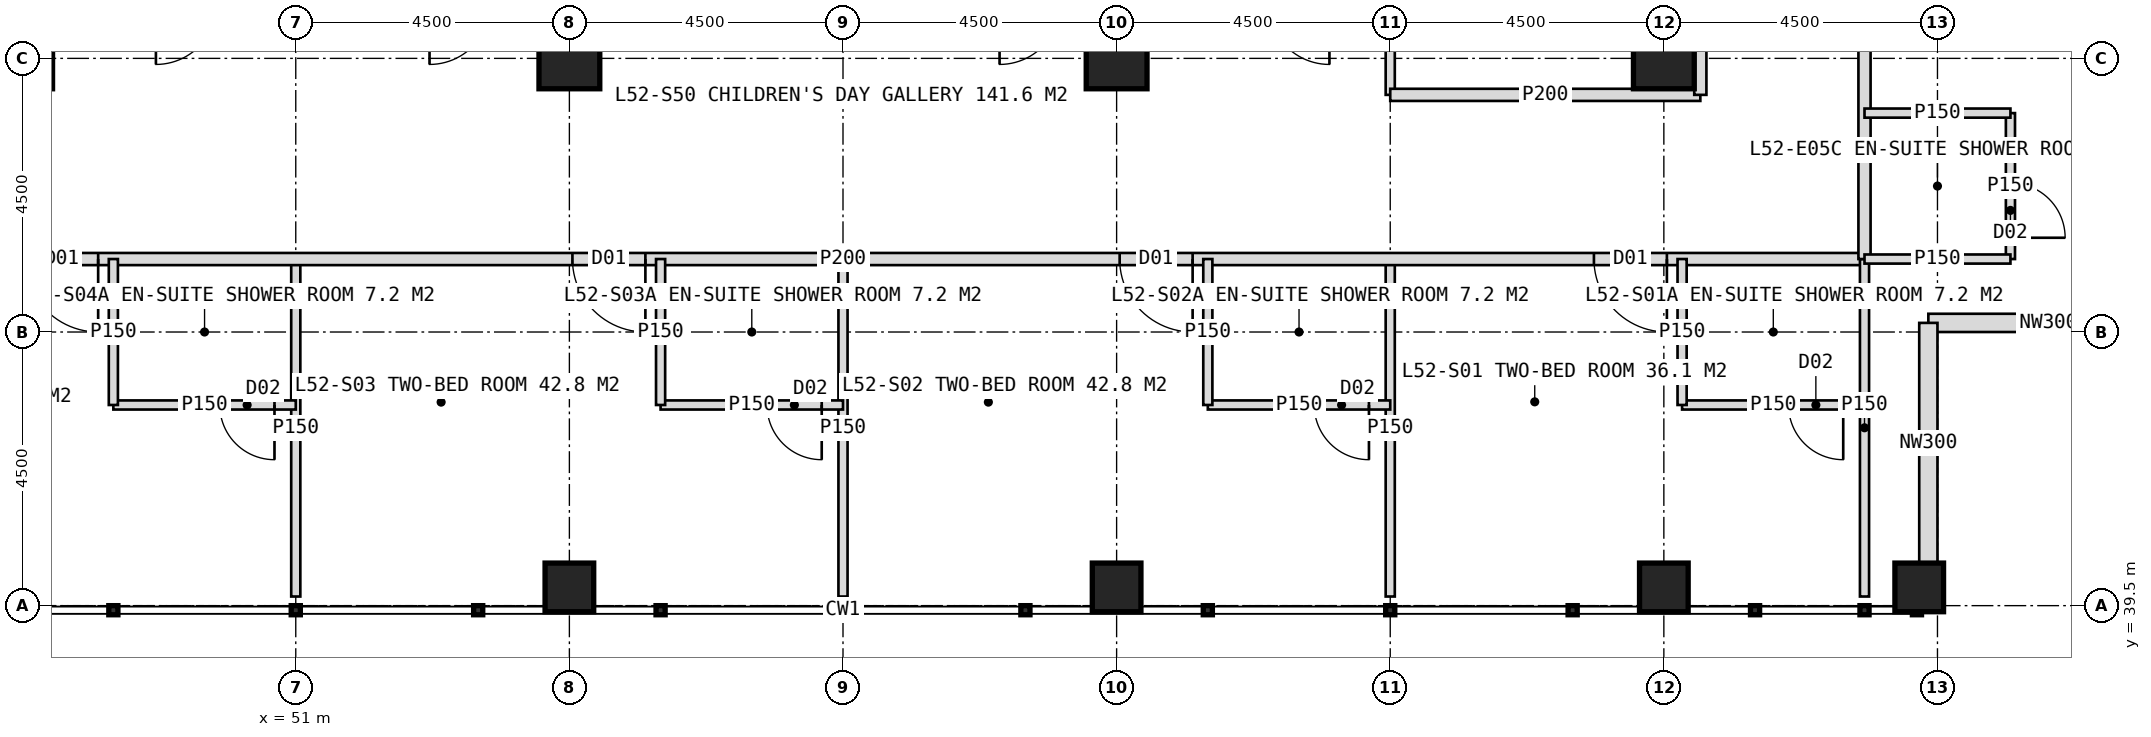
"""IFC4 building model, lengths in metres.
Left out: names, types, materials, properties, quantities, classifications, styles, units other than length and angle.
Written with IfcOpenShell. Run it as: python <this file> out.ifc"""

import sys

from ifc_helpers import new_model, si_unit, direction, frame, frame_2d, origin, origin_2d, place, context, subcontext, project, spatial, rectangle, hollow_rectangle, extrude, element, fill, save


model = new_model("IFC4")
c1 = context("Model", 3, precision=1e-05, world=origin(), true_north=direction((0.0, 1.0)))
c2 = subcontext(c1, "Body", "Model", "MODEL_VIEW")
j1 = project(units=[si_unit("LENGTHUNIT", "METRE"), si_unit("PLANEANGLEUNIT", "RADIAN")], contexts=[c1])
p1 = place(None, origin())
s1 = spatial("IfcSite", under=j1, at=p1, CompositionType="ELEMENT")
p2 = place(p1, origin())
s2 = spatial("IfcBuilding", under=s1, at=p2, CompositionType="ELEMENT")
p3 = place(p2, frame((0.0, 0.0, 217.0)))
s3 = spatial("IfcBuildingStorey", under=s2, at=p3, CompositionType="ELEMENT", Elevation=217.0)
for number, where, z_axis, x_axis in (
    (1, (73.5, 48.5, 0.0), (0.0, 0.0, 1.0), (1.0, 0.0, 0.0)),
    (2, (55.5, 48.5, 0.0), (0.0, 0.0, 1.0), (1.0, 0.0, 0.0)),
    (3, (64.5, 48.5, 0.0), (0.0, 0.0, 1.0), (1.0, 0.0, 0.0)),
):
    element("IfcColumn", number, at=place(p3, frame(where, z_axis=z_axis, x_axis=x_axis)), inside=s3, PredefinedType="COLUMN", context=c2, shape_type="SweptSolid", body=[
        extrude(hollow_rectangle(XDim=1.0, YDim=1.0, WallThickness=0.1, at=origin_2d()), origin(), (0.0, 0.0, 1.0), 4.0),
    ])
for number, where, z_axis, x_axis in (
    (4, (55.5, 39.8, 0.0), (0.0, 0.0, 1.0), (1.0, 0.0, 0.0)),
    (5, (64.5, 39.8, 0.0), (0.0, 0.0, 1.0), (1.0, 0.0, 0.0)),
    (6, (73.5, 39.8, 0.0), (0.0, 0.0, 1.0), (1.0, 0.0, 0.0)),
    (7, (77.7, 39.8, 0.0), (0.0, 0.0, 1.0), (1.0, 0.0, 0.0)),
):
    element("IfcColumn", number, at=place(p3, frame(where, z_axis=z_axis, x_axis=x_axis)), inside=s3, PredefinedType="COLUMN", context=c2, shape_type="SweptSolid", body=[
        extrude(hollow_rectangle(XDim=0.8, YDim=0.8, WallThickness=0.08, at=origin_2d()), origin(), (0.0, 0.0, 1.0), 4.0),
    ])
for number, where, z_axis, x_axis in (
    (8, (81.8, 44.15, 0.0), (0.0, 0.0, 1.0), (-1.0, 0.0, 0.0)),
    (9, (77.85, 44.15, 0.0), (0.0, 0.0, 1.0), (0.0, -1.0, 0.0)),
):
    element("IfcWall", number, at=place(p3, frame(where, z_axis=z_axis, x_axis=x_axis)), inside=s3, PredefinedType="ELEMENTEDWALL", context=c2, shape_type="SweptSolid", body=[
        extrude(rectangle(XDim=3.95, YDim=0.3, at=frame_2d((1.975, 0.0))), origin(), (0.0, 0.0, 1.0), 2.85),
    ])
p4 = place(p3, frame((69.0, 45.2, 0.0), z_axis=(0.0, 0.0, 1.0), x_axis=(0.0, -1.0, 0.0)))
e10 = element("IfcWall", 10, at=p4, inside=s3, PredefinedType="PARTITIONING", context=c2, shape_type="SweptSolid", body=[
    extrude(rectangle(XDim=5.55, YDim=0.15, at=frame_2d((2.775, 0.0))), origin(), (0.0, 0.0, 1.0), 3.75),
])
p5 = place(p3, frame((60.0, 45.2, 0.0), z_axis=(0.0, 0.0, 1.0), x_axis=(0.0, -1.0, 0.0)))
e11 = element("IfcWall", 11, at=p5, inside=s3, PredefinedType="PARTITIONING", context=c2, shape_type="SweptSolid", body=[
    extrude(rectangle(XDim=5.55, YDim=0.15, at=frame_2d((2.775, 0.0))), origin(), (0.0, 0.0, 1.0), 2.95),
])
p6 = place(p3, frame((51.0, 45.2, 0.0), z_axis=(0.0, 0.0, 1.0), x_axis=(0.0, -1.0, 0.0)))
e12 = element("IfcWall", 12, at=p6, inside=s3, PredefinedType="PARTITIONING", context=c2, shape_type="SweptSolid", body=[
    extrude(rectangle(XDim=5.55, YDim=0.15, at=frame_2d((2.775, 0.0))), origin(), (0.0, 0.0, 1.0), 3.75),
])
p7 = place(p3, frame((76.8, 45.2, 0.0), z_axis=(0.0, 0.0, 1.0), x_axis=(-1.0, 0.0, 0.0)))
e13 = element("IfcWall", 13, at=p7, inside=s3, PredefinedType="PARTITIONING", context=c2, shape_type="SweptSolid", body=[
    extrude(rectangle(XDim=33.6, YDim=0.2, at=frame_2d((16.8, 0.0))), origin(), (0.0, 0.0, 1.0), 3.75),
])
p8 = place(p7, frame((3.25, 0.0, 0.0)))
e14 = element("IfcOpeningElement", 14, at=p8, cuts=e13, PredefinedType="OPENING", context=c2, shape_type="SweptSolid", body=[
    extrude(rectangle(XDim=1.2, YDim=2.2, at=frame_2d((0.6, 1.1))), frame((0.0, 0.11, 0.0), z_axis=(0.0, -1.0, 0.0), x_axis=(1.0, 0.0, 0.0)), (0.0, 0.0, 1.0), 0.22),
])
p9 = place(p7, frame((11.05, 0.0, 0.0)))
e15 = element("IfcOpeningElement", 15, at=p9, cuts=e13, PredefinedType="OPENING", context=c2, shape_type="SweptSolid", body=[
    extrude(rectangle(XDim=1.2, YDim=2.2, at=frame_2d((0.6, 1.1))), frame((0.0, 0.11, 0.0), z_axis=(0.0, -1.0, 0.0), x_axis=(1.0, 0.0, 0.0)), (0.0, 0.0, 1.0), 0.22),
])
p10 = place(p7, frame((20.05, 0.0, 0.0)))
e16 = element("IfcOpeningElement", 16, at=p10, cuts=e13, PredefinedType="OPENING", context=c2, shape_type="SweptSolid", body=[
    extrude(rectangle(XDim=1.2, YDim=2.2, at=frame_2d((0.6, 1.1))), frame((0.0, 0.11, 0.0), z_axis=(0.0, -1.0, 0.0), x_axis=(1.0, 0.0, 0.0)), (0.0, 0.0, 1.0), 0.22),
])
p11 = place(p7, frame((29.05, 0.0, 0.0)))
e17 = element("IfcOpeningElement", 17, at=p11, cuts=e13, PredefinedType="OPENING", context=c2, shape_type="SweptSolid", body=[
    extrude(rectangle(XDim=1.2, YDim=2.2, at=frame_2d((0.6, 1.1))), frame((0.0, 0.11, 0.0), z_axis=(0.0, -1.0, 0.0), x_axis=(1.0, 0.0, 0.0)), (0.0, 0.0, 1.0), 0.22),
])
p12 = place(p3, frame((76.8, 45.2, 0.0), z_axis=(0.0, 0.0, 1.0), x_axis=(0.0, -1.0, 0.0)))
e18 = element("IfcWall", 18, at=p12, inside=s3, PredefinedType="PARTITIONING", context=c2, shape_type="SweptSolid", body=[
    extrude(rectangle(XDim=5.55, YDim=0.15, at=frame_2d((2.775, 0.0))), origin(), (0.0, 0.0, 1.0), 3.75),
])
p13 = place(p3, frame((76.8, 42.8, 0.0), z_axis=(0.0, 0.0, 1.0), x_axis=(-1.0, 0.0, 0.0)))
e19 = element("IfcWall", 19, at=p13, inside=s3, PredefinedType="PARTITIONING", context=c2, shape_type="SweptSolid", body=[
    extrude(rectangle(XDim=3.0, YDim=0.15, at=frame_2d((1.5, 0.0))), origin(), (0.0, 0.0, 1.0), 3.75),
])
p14 = place(p13, frame((0.35, 0.0, 0.0)))
e20 = element("IfcOpeningElement", 20, at=p14, cuts=e19, PredefinedType="OPENING", context=c2, shape_type="SweptSolid", body=[
    extrude(rectangle(XDim=0.9, YDim=2.1, at=frame_2d((0.45, 1.05))), frame((0.0, 0.085, 0.0), z_axis=(0.0, -1.0, 0.0), x_axis=(1.0, 0.0, 0.0)), (0.0, 0.0, 1.0), 0.17),
])
p15 = place(p3, frame((73.8, 45.2, 0.0), z_axis=(0.0, 0.0, 1.0), x_axis=(0.0, -1.0, 0.0)))
e21 = element("IfcWall", 21, at=p15, inside=s3, PredefinedType="PARTITIONING", context=c2, shape_type="SweptSolid", body=[
    extrude(rectangle(XDim=2.4, YDim=0.15, at=frame_2d((1.2, 0.0))), origin(), (0.0, 0.0, 1.0), 3.75),
])
p16 = place(p3, frame((69.0, 42.8, 0.0), z_axis=(0.0, 0.0, 1.0), x_axis=(-1.0, 0.0, 0.0)))
e22 = element("IfcWall", 22, at=p16, inside=s3, PredefinedType="PARTITIONING", context=c2, shape_type="SweptSolid", body=[
    extrude(rectangle(XDim=3.0, YDim=0.15, at=frame_2d((1.5, 0.0))), origin(), (0.0, 0.0, 1.0), 3.75),
])
p17 = place(p16, frame((0.35, 0.0, 0.0)))
e23 = element("IfcOpeningElement", 23, at=p17, cuts=e22, PredefinedType="OPENING", context=c2, shape_type="SweptSolid", body=[
    extrude(rectangle(XDim=0.9, YDim=2.1, at=frame_2d((0.45, 1.05))), frame((0.0, 0.085, 0.0), z_axis=(0.0, -1.0, 0.0), x_axis=(1.0, 0.0, 0.0)), (0.0, 0.0, 1.0), 0.17),
])
p18 = place(p3, frame((66.0, 45.2, 0.0), z_axis=(0.0, 0.0, 1.0), x_axis=(0.0, -1.0, 0.0)))
e24 = element("IfcWall", 24, at=p18, inside=s3, PredefinedType="PARTITIONING", context=c2, shape_type="SweptSolid", body=[
    extrude(rectangle(XDim=2.4, YDim=0.15, at=frame_2d((1.2, 0.0))), origin(), (0.0, 0.0, 1.0), 3.75),
])
p19 = place(p3, frame((60.0, 42.8, 0.0), z_axis=(0.0, 0.0, 1.0), x_axis=(-1.0, 0.0, 0.0)))
e25 = element("IfcWall", 25, at=p19, inside=s3, PredefinedType="PARTITIONING", context=c2, shape_type="SweptSolid", body=[
    extrude(rectangle(XDim=3.0, YDim=0.15, at=frame_2d((1.5, 0.0))), origin(), (0.0, 0.0, 1.0), 3.75),
])
p20 = place(p19, frame((0.35, 0.0, 0.0)))
e26 = element("IfcOpeningElement", 26, at=p20, cuts=e25, PredefinedType="OPENING", context=c2, shape_type="SweptSolid", body=[
    extrude(rectangle(XDim=0.9, YDim=2.1, at=frame_2d((0.45, 1.05))), frame((0.0, 0.085, 0.0), z_axis=(0.0, -1.0, 0.0), x_axis=(1.0, 0.0, 0.0)), (0.0, 0.0, 1.0), 0.17),
])
p21 = place(p3, frame((57.0, 45.2, 0.0), z_axis=(0.0, 0.0, 1.0), x_axis=(0.0, -1.0, 0.0)))
e27 = element("IfcWall", 27, at=p21, inside=s3, PredefinedType="PARTITIONING", context=c2, shape_type="SweptSolid", body=[
    extrude(rectangle(XDim=2.4, YDim=0.15, at=frame_2d((1.2, 0.0))), origin(), (0.0, 0.0, 1.0), 3.75),
])
p22 = place(p3, frame((51.0, 42.8, 0.0), z_axis=(0.0, 0.0, 1.0), x_axis=(-1.0, 0.0, 0.0)))
e28 = element("IfcWall", 28, at=p22, inside=s3, PredefinedType="PARTITIONING", context=c2, shape_type="SweptSolid", body=[
    extrude(rectangle(XDim=3.0, YDim=0.15, at=frame_2d((1.5, 0.0))), origin(), (0.0, 0.0, 1.0), 3.75),
])
p23 = place(p22, frame((0.35, 0.0, 0.0)))
e29 = element("IfcOpeningElement", 29, at=p23, cuts=e28, PredefinedType="OPENING", context=c2, shape_type="SweptSolid", body=[
    extrude(rectangle(XDim=0.9, YDim=2.1, at=frame_2d((0.45, 1.05))), frame((0.0, 0.085, 0.0), z_axis=(0.0, -1.0, 0.0), x_axis=(1.0, 0.0, 0.0)), (0.0, 0.0, 1.0), 0.17),
])
p24 = place(p3, frame((48.0, 45.2, 0.0), z_axis=(0.0, 0.0, 1.0), x_axis=(0.0, -1.0, 0.0)))
e30 = element("IfcWall", 30, at=p24, inside=s3, PredefinedType="PARTITIONING", context=c2, shape_type="SweptSolid", body=[
    extrude(rectangle(XDim=2.4, YDim=0.15, at=frame_2d((1.2, 0.0))), origin(), (0.0, 0.0, 1.0), 3.75),
])
p25 = place(p3, frame((69.0, 53.0, 0.0), z_axis=(0.0, 0.0, 1.0), x_axis=(0.0, -1.0, 0.0)))
e31 = element("IfcWall", 31, at=p25, inside=s3, PredefinedType="PARTITIONING", context=c2, shape_type="SweptSolid", body=[
    extrude(rectangle(XDim=5.1, YDim=0.15, at=frame_2d((2.55, 0.0))), origin(), (0.0, 0.0, 1.0), 3.75),
])
p26 = place(p3, frame((74.1, 47.9, 0.0), z_axis=(0.0, 0.0, 1.0), x_axis=(-1.0, 0.0, 0.0)))
e32 = element("IfcWall", 32, at=p26, inside=s3, PredefinedType="PARTITIONING", context=c2, shape_type="SweptSolid", body=[
    extrude(rectangle(XDim=5.1, YDim=0.2, at=frame_2d((2.55, 0.0))), origin(), (0.0, 0.0, 1.0), 3.75),
])
p27 = place(p3, frame((76.8, 78.8, 0.0), z_axis=(0.0, 0.0, 1.0), x_axis=(0.0, -1.0, 0.0)))
e33 = element("IfcWall", 33, at=p27, inside=s3, PredefinedType="PARTITIONING", context=c2, shape_type="SweptSolid", body=[
    extrude(rectangle(XDim=33.6, YDim=0.2, at=frame_2d((16.8, 0.0))), origin(), (0.0, 0.0, 1.0), 3.75),
])
p28 = place(p27, frame((3.25, 0.0, 0.0)))
e34 = element("IfcOpeningElement", 34, at=p28, cuts=e33, PredefinedType="OPENING", context=c2, shape_type="SweptSolid", body=[
    extrude(rectangle(XDim=1.2, YDim=2.2, at=frame_2d((0.6, 1.1))), frame((0.0, 0.11, 0.0), z_axis=(0.0, -1.0, 0.0), x_axis=(1.0, 0.0, 0.0)), (0.0, 0.0, 1.0), 0.22),
])
p29 = place(p27, frame((10.45, 0.0, 0.0)))
e35 = element("IfcOpeningElement", 35, at=p29, cuts=e33, PredefinedType="OPENING", context=c2, shape_type="SweptSolid", body=[
    extrude(rectangle(XDim=1.2, YDim=2.2, at=frame_2d((0.6, 1.1))), frame((0.0, 0.11, 0.0), z_axis=(0.0, -1.0, 0.0), x_axis=(1.0, 0.0, 0.0)), (0.0, 0.0, 1.0), 0.22),
])
p30 = place(p27, frame((14.8, 0.0, 0.0)))
e36 = element("IfcOpeningElement", 36, at=p30, cuts=e33, PredefinedType="OPENING", context=c2, shape_type="SweptSolid", body=[
    extrude(rectangle(XDim=1.0, YDim=2.1, at=frame_2d((0.5, 1.05))), frame((0.0, 0.11, 0.0), z_axis=(0.0, -1.0, 0.0), x_axis=(1.0, 0.0, 0.0)), (0.0, 0.0, 1.0), 0.22),
])
p31 = place(p27, frame((20.05, 0.0, 0.0)))
e37 = element("IfcOpeningElement", 37, at=p31, cuts=e33, PredefinedType="OPENING", context=c2, shape_type="SweptSolid", body=[
    extrude(rectangle(XDim=1.2, YDim=2.2, at=frame_2d((0.6, 1.1))), frame((0.0, 0.11, 0.0), z_axis=(0.0, -1.0, 0.0), x_axis=(1.0, 0.0, 0.0)), (0.0, 0.0, 1.0), 0.22),
])
p32 = place(p27, frame((26.95, 0.0, 0.0)))
e38 = element("IfcOpeningElement", 38, at=p32, cuts=e33, PredefinedType="OPENING", context=c2, shape_type="SweptSolid", body=[
    extrude(rectangle(XDim=1.2, YDim=2.2, at=frame_2d((0.6, 1.1))), frame((0.0, 0.11, 0.0), z_axis=(0.0, -1.0, 0.0), x_axis=(1.0, 0.0, 0.0)), (0.0, 0.0, 1.0), 0.22),
])
p33 = place(p3, frame((79.2, 47.6, 0.0), z_axis=(0.0, 0.0, 1.0), x_axis=(0.0, -1.0, 0.0)))
e39 = element("IfcWall", 39, at=p33, inside=s3, PredefinedType="PARTITIONING", context=c2, shape_type="SweptSolid", body=[
    extrude(rectangle(XDim=2.4, YDim=0.15, at=frame_2d((1.2, 0.0))), origin(), (0.0, 0.0, 1.0), 3.75),
])
p34 = place(p33, frame((1.15, 0.0, 0.0)))
e40 = element("IfcOpeningElement", 40, at=p34, cuts=e39, PredefinedType="OPENING", context=c2, shape_type="SweptSolid", body=[
    extrude(rectangle(XDim=0.9, YDim=2.1, at=frame_2d((0.45, 1.05))), frame((0.0, 0.085, 0.0), z_axis=(0.0, -1.0, 0.0), x_axis=(1.0, 0.0, 0.0)), (0.0, 0.0, 1.0), 0.17),
])
for number, where, z_axis, x_axis in (
    (41, (76.8, 47.6, 0.0), (0.0, 0.0, 1.0), (1.0, 0.0, 0.0)),
    (42, (76.8, 45.2, 0.0), (0.0, 0.0, 1.0), (1.0, 0.0, 0.0)),
):
    element("IfcWall", number, at=place(p3, frame(where, z_axis=z_axis, x_axis=x_axis)), inside=s3, PredefinedType="PARTITIONING", context=c2, shape_type="SweptSolid", body=[
        extrude(rectangle(XDim=2.4, YDim=0.15, at=frame_2d((1.2, 0.0))), origin(), (0.0, 0.0, 1.0), 3.75),
    ])
p35 = place(p3, frame((74.1, 62.0, 0.0), z_axis=(0.0, 0.0, 1.0), x_axis=(0.0, -1.0, 0.0)))
e43 = element("IfcWall", 43, at=p35, inside=s3, PredefinedType="PARTITIONING", context=c2, shape_type="SweptSolid", body=[
    extrude(rectangle(XDim=14.1, YDim=0.2, at=frame_2d((7.05, 0.0))), origin(), (0.0, 0.0, 1.0), 3.75),
])
p36 = place(p35, frame((1.45, 0.0, 0.0)))
e44 = element("IfcOpeningElement", 44, at=p36, cuts=e43, PredefinedType="OPENING", context=c2, shape_type="SweptSolid", body=[
    extrude(rectangle(XDim=1.0, YDim=2.1, at=frame_2d((0.5, 1.05))), frame((0.0, 0.11, 0.0), z_axis=(0.0, -1.0, 0.0), x_axis=(1.0, 0.0, 0.0)), (0.0, 0.0, 1.0), 0.22),
])
p37 = place(p35, frame((10.3, 0.0, 0.0)))
e45 = element("IfcOpeningElement", 45, at=p37, cuts=e43, PredefinedType="OPENING", context=c2, shape_type="SweptSolid", body=[
    extrude(rectangle(XDim=1.0, YDim=2.1, at=frame_2d((0.5, 1.05))), frame((0.0, 0.11, 0.0), z_axis=(0.0, -1.0, 0.0), x_axis=(1.0, 0.0, 0.0)), (0.0, 0.0, 1.0), 0.22),
])
p38 = place(p8, origin())
e46 = element("IfcDoor", 46, at=p38, inside=s3, OperationType="SINGLE_SWING_LEFT", PredefinedType="DOOR", context=c2, shape_type="SweptSolid", body=[
    extrude(rectangle(XDim=1.2, YDim=2.2, at=frame_2d((0.6, 1.1))), frame((0.0, 0.025, 0.0), z_axis=(0.0, -1.0, 0.0), x_axis=(1.0, 0.0, 0.0)), (0.0, 0.0, 1.0), 0.05),
])
fill(e14, e46)
p39 = place(p14, origin())
e47 = element("IfcDoor", 47, at=p39, inside=s3, OperationType="SINGLE_SWING_LEFT", PredefinedType="DOOR", context=c2, shape_type="SweptSolid", body=[
    extrude(rectangle(XDim=0.9, YDim=2.1, at=frame_2d((0.45, 1.05))), frame((0.0, 0.025, 0.0), z_axis=(0.0, -1.0, 0.0), x_axis=(1.0, 0.0, 0.0)), (0.0, 0.0, 1.0), 0.05),
])
fill(e20, e47)
p40 = place(p9, origin())
e48 = element("IfcDoor", 48, at=p40, inside=s3, OperationType="SINGLE_SWING_LEFT", PredefinedType="DOOR", context=c2, shape_type="SweptSolid", body=[
    extrude(rectangle(XDim=1.2, YDim=2.2, at=frame_2d((0.6, 1.1))), frame((0.0, 0.025, 0.0), z_axis=(0.0, -1.0, 0.0), x_axis=(1.0, 0.0, 0.0)), (0.0, 0.0, 1.0), 0.05),
])
fill(e15, e48)
p41 = place(p17, origin())
e49 = element("IfcDoor", 49, at=p41, inside=s3, OperationType="SINGLE_SWING_LEFT", PredefinedType="DOOR", context=c2, shape_type="SweptSolid", body=[
    extrude(rectangle(XDim=0.9, YDim=2.1, at=frame_2d((0.45, 1.05))), frame((0.0, 0.025, 0.0), z_axis=(0.0, -1.0, 0.0), x_axis=(1.0, 0.0, 0.0)), (0.0, 0.0, 1.0), 0.05),
])
fill(e23, e49)
p42 = place(p10, origin())
e50 = element("IfcDoor", 50, at=p42, inside=s3, OperationType="SINGLE_SWING_LEFT", PredefinedType="DOOR", context=c2, shape_type="SweptSolid", body=[
    extrude(rectangle(XDim=1.2, YDim=2.2, at=frame_2d((0.6, 1.1))), frame((0.0, 0.025, 0.0), z_axis=(0.0, -1.0, 0.0), x_axis=(1.0, 0.0, 0.0)), (0.0, 0.0, 1.0), 0.05),
])
fill(e16, e50)
p43 = place(p20, origin())
e51 = element("IfcDoor", 51, at=p43, inside=s3, OperationType="SINGLE_SWING_LEFT", PredefinedType="DOOR", context=c2, shape_type="SweptSolid", body=[
    extrude(rectangle(XDim=0.9, YDim=2.1, at=frame_2d((0.45, 1.05))), frame((0.0, 0.025, 0.0), z_axis=(0.0, -1.0, 0.0), x_axis=(1.0, 0.0, 0.0)), (0.0, 0.0, 1.0), 0.05),
])
fill(e26, e51)
p44 = place(p11, origin())
e52 = element("IfcDoor", 52, at=p44, inside=s3, OperationType="SINGLE_SWING_LEFT", PredefinedType="DOOR", context=c2, shape_type="SweptSolid", body=[
    extrude(rectangle(XDim=1.2, YDim=2.2, at=frame_2d((0.6, 1.1))), frame((0.0, 0.025, 0.0), z_axis=(0.0, -1.0, 0.0), x_axis=(1.0, 0.0, 0.0)), (0.0, 0.0, 1.0), 0.05),
])
fill(e17, e52)
p45 = place(p23, origin())
e53 = element("IfcDoor", 53, at=p45, inside=s3, OperationType="SINGLE_SWING_LEFT", PredefinedType="DOOR", context=c2, shape_type="SweptSolid", body=[
    extrude(rectangle(XDim=0.9, YDim=2.1, at=frame_2d((0.45, 1.05))), frame((0.0, 0.025, 0.0), z_axis=(0.0, -1.0, 0.0), x_axis=(1.0, 0.0, 0.0)), (0.0, 0.0, 1.0), 0.05),
])
fill(e29, e53)
p46 = place(p34, origin())
e54 = element("IfcDoor", 54, at=p46, inside=s3, OperationType="SINGLE_SWING_RIGHT", PredefinedType="DOOR", context=c2, shape_type="SweptSolid", body=[
    extrude(rectangle(XDim=0.9, YDim=2.1, at=frame_2d((0.45, 1.05))), frame((0.0, 0.025, 0.0), z_axis=(0.0, -1.0, 0.0), x_axis=(1.0, 0.0, 0.0)), (0.0, 0.0, 1.0), 0.05),
])
fill(e40, e54)
save(model, sys.argv[1])
